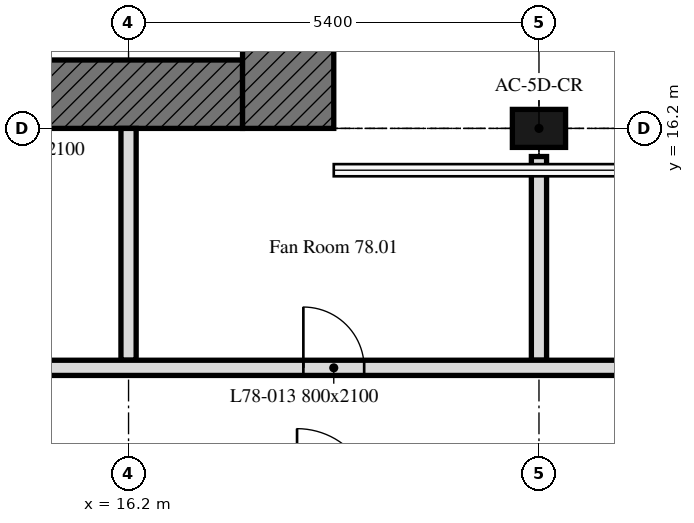
"""IFC4 building model, lengths in metres.
Left out: names, types, materials, properties, quantities, classifications, styles, units other than length and angle.
Written with IfcOpenShell. Run it as: python <this file> out.ifc"""

import sys

from ifc_helpers import new_model, si_unit, direction, frame, frame_2d, origin, origin_2d, place, context, subcontext, project, spatial, rectangle, extrude, element, fill, save


model = new_model("IFC4")
c1 = context("Model", 3, precision=1e-05, world=origin(), true_north=direction((0.0, 1.0)))
c2 = subcontext(c1, "Body", "Model", "MODEL_VIEW")
j1 = project(units=[si_unit("LENGTHUNIT", "METRE"), si_unit("PLANEANGLEUNIT", "RADIAN")], contexts=[c1])
p1 = place(None, origin())
s1 = spatial("IfcSite", under=j1, at=p1, CompositionType="ELEMENT")
p2 = place(p1, origin())
s2 = spatial("IfcBuilding", under=s1, at=p2, CompositionType="ELEMENT")
p3 = place(p2, frame((0.0, 0.0, 312.7)))
s3 = spatial("IfcBuildingStorey", under=s2, at=p3, CompositionType="ELEMENT", Elevation=312.7)
p4 = place(p3, frame((21.6, 16.2, 0.0), z_axis=(0.0, 0.0, 1.0), x_axis=(1.0, 0.0, 0.0)))
e1 = element("IfcColumn", 1, at=p4, inside=s3, PredefinedType="COLUMN", context=c2, shape_type="SweptSolid", body=[
    extrude(rectangle(XDim=0.7, YDim=0.5, at=origin_2d()), origin(), (0.0, 0.0, 1.0), 4.2),
])
p5 = place(p3, frame((17.7, 16.65, 0.0), z_axis=(0.0, 0.0, 1.0), x_axis=(-1.0, 0.0, 0.0)))
e2 = element("IfcWall", 2, at=p5, inside=s3, PredefinedType="SOLIDWALL", context=c2, shape_type="SweptSolid", body=[
    extrude(rectangle(XDim=11.1, YDim=0.9, at=frame_2d((5.55, 0.0))), origin(), (0.0, 0.0, 1.0), 4.2),
])
p6 = place(p5, frame((5.55, 0.0, 0.0)))
e3 = element("IfcOpeningElement", 3, at=p6, cuts=e2, PredefinedType="OPENING", context=c2, shape_type="SweptSolid", body=[
    extrude(rectangle(XDim=2.0, YDim=2.4, at=frame_2d((1.0, 1.2))), frame((0.0, 0.45, 0.0), z_axis=(0.0, -1.0, 0.0), x_axis=(1.0, 0.0, 0.0)), (0.0, 0.0, 1.0), 0.9),
])
p7 = place(p3, frame((18.3, 32.4, 0.0), z_axis=(0.0, 0.0, 1.0), x_axis=(0.0, -1.0, 0.0)))
e4 = element("IfcWall", 4, at=p7, inside=s3, PredefinedType="SOLIDWALL", context=c2, shape_type="SweptSolid", body=[
    extrude(rectangle(XDim=16.2, YDim=1.2, at=frame_2d((8.1, 0.0))), origin(), (0.0, 0.0, 1.0), 4.2),
])
p8 = place(p3, frame((21.6, 15.83, 0.0), z_axis=(0.0, 0.0, 1.0), x_axis=(0.0, -1.0, 0.0)))
e5 = element("IfcWall", 5, at=p8, inside=s3, PredefinedType="PARTITIONING", context=c2, shape_type="SweptSolid", body=[
    extrude(rectangle(XDim=2.68, YDim=0.2, at=frame_2d((1.34, 0.0))), origin(), (0.0, 0.0, 1.0), 4.2),
])
p9 = place(p3, frame((16.2, 16.2, 0.0), z_axis=(0.0, 0.0, 1.0), x_axis=(0.0, -1.0, 0.0)))
e6 = element("IfcWall", 6, at=p9, inside=s3, PredefinedType="PARTITIONING", context=c2, shape_type="SweptSolid", body=[
    extrude(rectangle(XDim=3.05, YDim=0.2, at=frame_2d((1.525, 0.0))), origin(), (0.0, 0.0, 1.0), 4.2),
])
p10 = place(p3, frame((5.3, 13.05, 0.0), z_axis=(0.0, 0.0, 1.0), x_axis=(1.0, 0.0, 0.0)))
e7 = element("IfcWall", 7, at=p10, inside=s3, PredefinedType="PARTITIONING", context=c2, shape_type="SweptSolid", body=[
    extrude(rectangle(XDim=36.049, YDim=0.2, at=frame_2d((18.024, 0.0))), origin(), (0.0, 0.0, 1.0), 4.2),
])
p11 = place(p10, frame((23.9, 0.0, 0.0)))
e8 = element("IfcOpeningElement", 8, at=p11, cuts=e7, PredefinedType="OPENING", context=c2, shape_type="SweptSolid", body=[
    extrude(rectangle(XDim=1.0, YDim=2.1, at=frame_2d((0.5, 1.05))), frame((0.0, 0.1, 0.0), z_axis=(0.0, -1.0, 0.0), x_axis=(1.0, 0.0, 0.0)), (0.0, 0.0, 1.0), 0.2),
])
p12 = place(p10, frame((18.5, 0.0, 0.0)))
e9 = element("IfcOpeningElement", 9, at=p12, cuts=e7, PredefinedType="OPENING", context=c2, shape_type="SweptSolid", body=[
    extrude(rectangle(XDim=1.0, YDim=2.1, at=frame_2d((0.5, 1.05))), frame((0.0, 0.1, 0.0), z_axis=(0.0, -1.0, 0.0), x_axis=(1.0, 0.0, 0.0)), (0.0, 0.0, 1.0), 0.2),
])
p13 = place(p10, frame((13.2, 0.0, 0.0)))
e10 = element("IfcOpeningElement", 10, at=p13, cuts=e7, PredefinedType="OPENING", context=c2, shape_type="SweptSolid", body=[
    extrude(rectangle(XDim=0.8, YDim=2.1, at=frame_2d((0.4, 1.05))), frame((0.0, 0.1, 0.0), z_axis=(0.0, -1.0, 0.0), x_axis=(1.0, 0.0, 0.0)), (0.0, 0.0, 1.0), 0.2),
])
p14 = place(p10, frame((29.5, 0.0, 0.0)))
e11 = element("IfcOpeningElement", 11, at=p14, cuts=e7, PredefinedType="OPENING", context=c2, shape_type="SweptSolid", body=[
    extrude(rectangle(XDim=1.8, YDim=2.4, at=frame_2d((0.9, 1.2))), frame((0.0, 0.1, 0.0), z_axis=(0.0, -1.0, 0.0), x_axis=(1.0, 0.0, 0.0)), (0.0, 0.0, 1.0), 0.2),
])
p15 = place(p10, frame((2.5, 0.0, 0.0)))
e12 = element("IfcOpeningElement", 12, at=p15, cuts=e7, PredefinedType="OPENING", context=c2, shape_type="SweptSolid", body=[
    extrude(rectangle(XDim=1.8, YDim=2.4, at=frame_2d((0.9, 1.2))), frame((0.0, 0.1, 0.0), z_axis=(0.0, -1.0, 0.0), x_axis=(1.0, 0.0, 0.0)), (0.0, 0.0, 1.0), 0.2),
])
p16 = place(p13, origin())
e13 = element("IfcDoor", 13, at=p16, inside=s3, OperationType="SINGLE_SWING_RIGHT", PredefinedType="DOOR", context=c2, shape_type="SweptSolid", body=[
    extrude(rectangle(XDim=0.8, YDim=2.1, at=frame_2d((0.4, 1.05))), frame((0.0, 0.025, 0.0), z_axis=(0.0, -1.0, 0.0), x_axis=(1.0, 0.0, 0.0)), (0.0, 0.0, 1.0), 0.05),
])
fill(e10, e13)
save(model, sys.argv[1])
